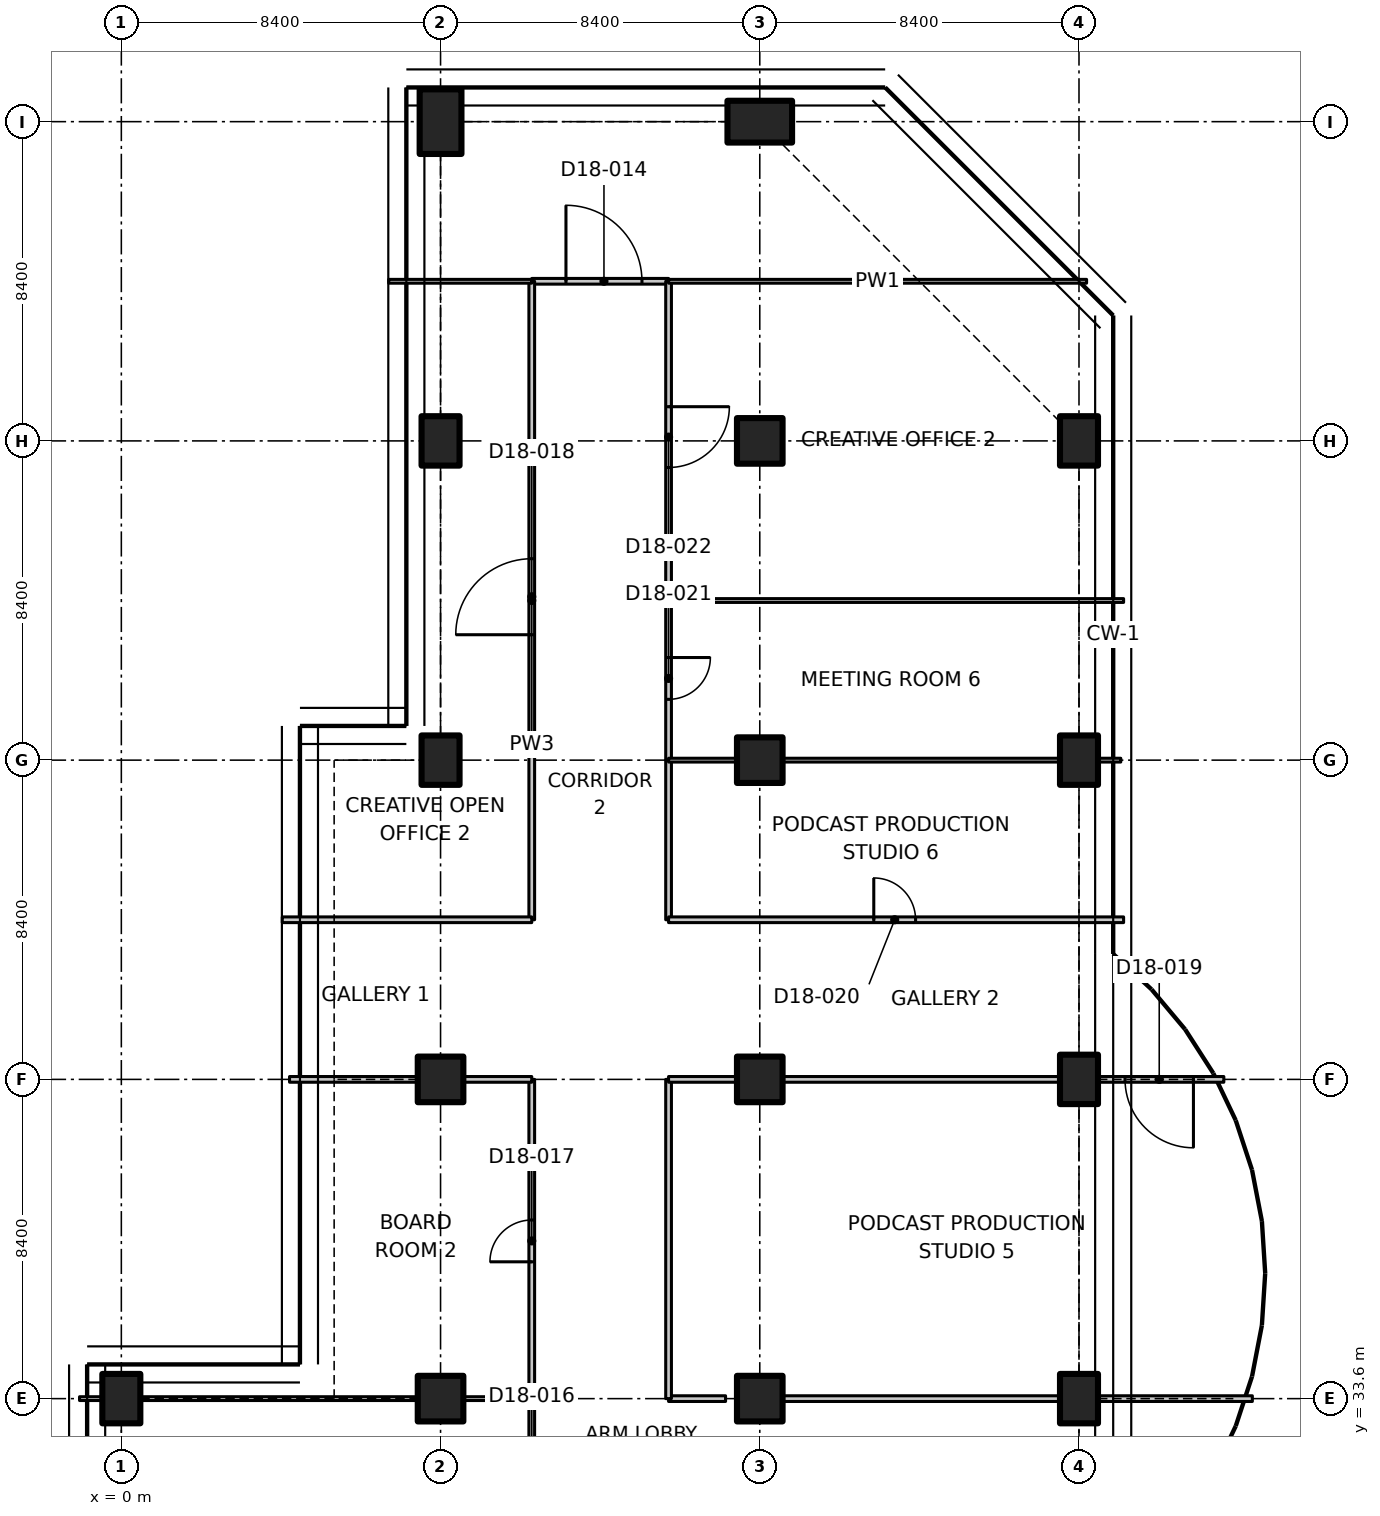
"""IFC4 building model, lengths in metres.
Left out: names, types, materials, properties, quantities, classifications, styles, units other than length and angle.
Written with IfcOpenShell. Run it as: python <this file> out.ifc"""

import sys

from ifc_helpers import new_model, si_unit, direction, frame, frame_2d, origin, origin_2d, place, context, subcontext, project, spatial, polyline, rectangle, outline, extrude, element, fill, save


model = new_model("IFC4")
c1 = context("Model", 3, precision=1e-05, world=origin(), true_north=direction((0.0, 1.0)))
c2 = subcontext(c1, "Body", "Model", "MODEL_VIEW")
j1 = project(units=[si_unit("LENGTHUNIT", "METRE"), si_unit("PLANEANGLEUNIT", "RADIAN")], contexts=[c1])
p1 = place(None, origin())
s1 = spatial("IfcSite", under=j1, at=p1, CompositionType="ELEMENT")
p2 = place(p1, origin())
s2 = spatial("IfcBuilding", under=s1, at=p2, CompositionType="ELEMENT")
p3 = place(p2, frame((0.0, 0.0, 145.7)))
s3 = spatial("IfcBuildingStorey", under=s2, at=p3, CompositionType="ELEMENT", Elevation=145.7)
p4 = place(p3, frame((0.0, 33.6, 0.0), z_axis=(0.0, 0.0, 1.0), x_axis=(1.0, 0.0, 0.0)))
e1 = element("IfcColumn", 1, at=p4, inside=s3, PredefinedType="COLUMN", context=c2, shape_type="SweptSolid", body=[
    extrude(rectangle(XDim=1.0, YDim=1.3, at=origin_2d()), origin(), (0.0, 0.0, 1.0), 3.35),
])
for number, where, z_axis, x_axis in (
    (2, (8.4, 33.6, 0.0), (0.0, 0.0, 1.0), (1.0, 0.0, 0.0)),
    (3, (8.4, 42.0, 0.0), (0.0, 0.0, 1.0), (1.0, 0.0, 0.0)),
):
    element("IfcColumn", number, at=place(p3, frame(where, z_axis=z_axis, x_axis=x_axis)), inside=s3, PredefinedType="COLUMN", context=c2, shape_type="SweptSolid", body=[
        extrude(rectangle(XDim=1.2, YDim=1.2, at=origin_2d()), origin(), (0.0, 0.0, 1.0), 3.35),
    ])
for number, where, z_axis, x_axis in (
    (4, (8.4, 50.4, 0.0), (0.0, 0.0, 1.0), (1.0, 0.0, 0.0)),
    (5, (8.4, 58.8, 0.0), (0.0, 0.0, 1.0), (1.0, 0.0, 0.0)),
):
    element("IfcColumn", number, at=place(p3, frame(where, z_axis=z_axis, x_axis=x_axis)), inside=s3, PredefinedType="COLUMN", context=c2, shape_type="SweptSolid", body=[
        extrude(rectangle(XDim=1.0, YDim=1.3, at=origin_2d()), origin(), (0.0, 0.0, 1.0), 3.35),
    ])
p5 = place(p3, frame((8.4, 67.2, 0.0), z_axis=(0.0, 0.0, 1.0), x_axis=(1.0, 0.0, 0.0)))
e6 = element("IfcColumn", 6, at=p5, inside=s3, PredefinedType="COLUMN", context=c2, shape_type="SweptSolid", body=[
    extrude(rectangle(XDim=1.1, YDim=1.7, at=origin_2d()), origin(), (0.0, 0.0, 1.0), 3.35),
])
for number, where, z_axis, x_axis in (
    (7, (16.8, 33.6, 0.0), (0.0, 0.0, 1.0), (1.0, 0.0, 0.0)),
    (8, (16.8, 42.0, 0.0), (0.0, 0.0, 1.0), (1.0, 0.0, 0.0)),
    (9, (16.8, 50.4, 0.0), (0.0, 0.0, 1.0), (1.0, 0.0, 0.0)),
    (10, (16.8, 58.8, 0.0), (0.0, 0.0, 1.0), (1.0, 0.0, 0.0)),
):
    element("IfcColumn", number, at=place(p3, frame(where, z_axis=z_axis, x_axis=x_axis)), inside=s3, PredefinedType="COLUMN", context=c2, shape_type="SweptSolid", body=[
        extrude(rectangle(XDim=1.2, YDim=1.2, at=origin_2d()), origin(), (0.0, 0.0, 1.0), 3.35),
    ])
p6 = place(p3, frame((16.8, 67.2, 0.0), z_axis=(0.0, 0.0, 1.0), x_axis=(0.0, 1.0, 0.0)))
e11 = element("IfcColumn", 11, at=p6, inside=s3, PredefinedType="COLUMN", context=c2, shape_type="SweptSolid", body=[
    extrude(rectangle(XDim=1.1, YDim=1.7, at=origin_2d()), origin(), (0.0, 0.0, 1.0), 3.35),
])
for number, where, z_axis, x_axis in (
    (12, (25.2, 33.6, 0.0), (0.0, 0.0, 1.0), (1.0, 0.0, 0.0)),
    (13, (25.2, 42.0, 0.0), (0.0, 0.0, 1.0), (1.0, 0.0, 0.0)),
    (14, (25.2, 50.4, 0.0), (0.0, 0.0, 1.0), (1.0, 0.0, 0.0)),
    (15, (25.2, 58.8, 0.0), (0.0, 0.0, 1.0), (1.0, 0.0, 0.0)),
):
    element("IfcColumn", number, at=place(p3, frame(where, z_axis=z_axis, x_axis=x_axis)), inside=s3, PredefinedType="COLUMN", context=c2, shape_type="SweptSolid", body=[
        extrude(rectangle(XDim=1.0, YDim=1.3, at=origin_2d()), origin(), (0.0, 0.0, 1.0), 3.35),
    ])
p7 = place(p3, frame((10.8, 29.4, 0.0), z_axis=(0.0, 0.0, 1.0), x_axis=(0.0, 1.0, 0.0)))
e16 = element("IfcWall", 16, at=p7, inside=s3, PredefinedType="PARTITIONING", context=c2, shape_type="SweptSolid", body=[
    extrude(rectangle(XDim=4.2, YDim=0.15, at=frame_2d((2.1, 0.0))), origin(), (0.0, 0.0, 1.0), 3.33),
])
p8 = place(p7, frame((1.5, 0.0, 0.0)))
e17 = element("IfcOpeningElement", 17, at=p8, cuts=e16, PredefinedType="OPENING", context=c2, shape_type="SweptSolid", body=[
    extrude(rectangle(XDim=1.1, YDim=2.1, at=frame_2d((0.55, 1.05))), frame((0.0, 0.085, 0.0), z_axis=(0.0, -1.0, 0.0), x_axis=(1.0, 0.0, 0.0)), (0.0, 0.0, 1.0), 0.17),
])
p9 = place(p3, frame((14.4, 33.6, 0.0), z_axis=(0.0, 0.0, 1.0), x_axis=(1.0, 0.0, 0.0)))
e18 = element("IfcWall", 18, at=p9, inside=s3, PredefinedType="PARTITIONING", context=c2, shape_type="SweptSolid", body=[
    extrude(rectangle(XDim=1.5, YDim=0.15, at=frame_2d((0.75, 0.0))), origin(), (0.0, 0.0, 1.0), 3.33),
])
p10 = place(p3, frame((17.42, 33.6, 0.0), z_axis=(0.0, 0.0, 1.0), x_axis=(1.0, 0.0, 0.0)))
e19 = element("IfcWall", 19, at=p10, inside=s3, PredefinedType="PARTITIONING", context=c2, shape_type="SweptSolid", body=[
    extrude(rectangle(XDim=7.26, YDim=0.15, at=frame_2d((3.63, 0.0))), origin(), (0.0, 0.0, 1.0), 3.33),
])
p11 = place(p3, frame((25.72, 33.6, 0.0), z_axis=(0.0, 0.0, 1.0), x_axis=(1.0, 0.0, 0.0)))
e20 = element("IfcWall", 20, at=p11, inside=s3, PredefinedType="PARTITIONING", context=c2, shape_type="SweptSolid", body=[
    extrude(rectangle(XDim=4.042, YDim=0.15, at=frame_2d((2.021, 0.0))), origin(), (0.0, 0.0, 1.0), 2.98),
])
p12 = place(p3, frame((10.8, 63.0, 0.0), z_axis=(0.0, 0.0, 1.0), x_axis=(1.0, 0.0, 0.0)))
e21 = element("IfcWall", 21, at=p12, inside=s3, PredefinedType="PARTITIONING", context=c2, shape_type="SweptSolid", body=[
    extrude(rectangle(XDim=3.6, YDim=0.15, at=frame_2d((1.8, 0.0))), origin(), (0.0, 0.0, 1.0), 3.33),
])
p13 = place(p12, frame((0.9, 0.0, 0.0)))
e22 = element("IfcOpeningElement", 22, at=p13, cuts=e21, PredefinedType="OPENING", context=c2, shape_type="SweptSolid", body=[
    extrude(rectangle(XDim=2.0, YDim=2.4, at=frame_2d((1.0, 1.2))), frame((0.0, 0.085, 0.0), z_axis=(0.0, -1.0, 0.0), x_axis=(1.0, 0.0, 0.0)), (0.0, 0.0, 1.0), 0.17),
])
p14 = place(p3, frame((10.8, 33.6, 0.0), z_axis=(0.0, 0.0, 1.0), x_axis=(0.0, 1.0, 0.0)))
e23 = element("IfcWall", 23, at=p14, inside=s3, PredefinedType="PARTITIONING", context=c2, shape_type="SweptSolid", body=[
    extrude(rectangle(XDim=8.4, YDim=0.15, at=frame_2d((4.2, 0.0))), origin(), (0.0, 0.0, 1.0), 3.33),
])
p15 = place(p14, frame((3.6, 0.0, 0.0)))
e24 = element("IfcOpeningElement", 24, at=p15, cuts=e23, PredefinedType="OPENING", context=c2, shape_type="SweptSolid", body=[
    extrude(rectangle(XDim=1.1, YDim=2.1, at=frame_2d((0.55, 1.05))), frame((0.0, 0.085, 0.0), z_axis=(0.0, -1.0, 0.0), x_axis=(1.0, 0.0, 0.0)), (0.0, 0.0, 1.0), 0.17),
])
p16 = place(p3, frame((10.8, 46.2, 0.0), z_axis=(0.0, 0.0, 1.0), x_axis=(0.0, 1.0, 0.0)))
e25 = element("IfcWall", 25, at=p16, inside=s3, PredefinedType="PARTITIONING", context=c2, shape_type="SweptSolid", body=[
    extrude(rectangle(XDim=16.8, YDim=0.15, at=frame_2d((8.4, 0.0))), origin(), (0.0, 0.0, 1.0), 3.33),
])
p17 = place(p16, frame((7.5, 0.0, 0.0)))
e26 = element("IfcOpeningElement", 26, at=p17, cuts=e25, PredefinedType="OPENING", context=c2, shape_type="SweptSolid", body=[
    extrude(rectangle(XDim=2.0, YDim=2.4, at=frame_2d((1.0, 1.2))), frame((0.0, 0.085, 0.0), z_axis=(0.0, -1.0, 0.0), x_axis=(1.0, 0.0, 0.0)), (0.0, 0.0, 1.0), 0.17),
])
p18 = place(p3, frame((14.4, 42.0, 0.0), z_axis=(0.0, 0.0, 1.0), x_axis=(0.0, -1.0, 0.0)))
e27 = element("IfcWall", 27, at=p18, inside=s3, PredefinedType="PARTITIONING", context=c2, shape_type="SweptSolid", body=[
    extrude(rectangle(XDim=8.4, YDim=0.15, at=frame_2d((4.2, 0.0))), origin(), (0.0, 0.0, 1.0), 3.33),
])
p19 = place(p3, frame((14.4, 50.4, 0.0), z_axis=(0.0, 0.0, 1.0), x_axis=(0.0, -1.0, 0.0)))
e28 = element("IfcWall", 28, at=p19, inside=s3, PredefinedType="PARTITIONING", context=c2, shape_type="SweptSolid", body=[
    extrude(rectangle(XDim=4.2, YDim=0.15, at=frame_2d((2.1, 0.0))), origin(), (0.0, 0.0, 1.0), 3.33),
])
p20 = place(p3, frame((14.4, 54.6, 0.0), z_axis=(0.0, 0.0, 1.0), x_axis=(0.0, -1.0, 0.0)))
e29 = element("IfcWall", 29, at=p20, inside=s3, PredefinedType="PARTITIONING", context=c2, shape_type="SweptSolid", body=[
    extrude(rectangle(XDim=4.2, YDim=0.15, at=frame_2d((2.1, 0.0))), origin(), (0.0, 0.0, 1.0), 3.33),
])
p21 = place(p20, frame((1.5, 0.0, 0.0)))
e30 = element("IfcOpeningElement", 30, at=p21, cuts=e29, PredefinedType="OPENING", context=c2, shape_type="SweptSolid", body=[
    extrude(rectangle(XDim=1.1, YDim=2.1, at=frame_2d((0.55, 1.05))), frame((0.0, 0.085, 0.0), z_axis=(0.0, -1.0, 0.0), x_axis=(1.0, 0.0, 0.0)), (0.0, 0.0, 1.0), 0.17),
])
p22 = place(p3, frame((14.4, 63.0, 0.0), z_axis=(0.0, 0.0, 1.0), x_axis=(0.0, -1.0, 0.0)))
e31 = element("IfcWall", 31, at=p22, inside=s3, PredefinedType="PARTITIONING", context=c2, shape_type="SweptSolid", body=[
    extrude(rectangle(XDim=8.4, YDim=0.15, at=frame_2d((4.2, 0.0))), origin(), (0.0, 0.0, 1.0), 3.33),
])
p23 = place(p22, frame((3.3, 0.0, 0.0)))
e32 = element("IfcOpeningElement", 32, at=p23, cuts=e31, PredefinedType="OPENING", context=c2, shape_type="SweptSolid", body=[
    extrude(rectangle(XDim=1.6, YDim=2.1, at=frame_2d((0.8, 1.05))), frame((0.0, 0.085, 0.0), z_axis=(0.0, -1.0, 0.0), x_axis=(1.0, 0.0, 0.0)), (0.0, 0.0, 1.0), 0.17),
])
p24 = place(p3, frame((10.8, 63.0, 0.0), z_axis=(0.0, 0.0, 1.0), x_axis=(-1.0, 0.0, 0.0)))
e33 = element("IfcWall", 33, at=p24, inside=s3, PredefinedType="PARTITIONING", context=c2, shape_type="SweptSolid", body=[
    extrude(rectangle(XDim=3.765, YDim=0.1, at=frame_2d((1.883, 0.0))), origin(), (0.0, 0.0, 1.0), 2.98),
])
p25 = place(p3, frame((25.4, 63.0, 0.0), z_axis=(0.0, 0.0, 1.0), x_axis=(-1.0, 0.0, 0.0)))
e34 = element("IfcWall", 34, at=p25, inside=s3, PredefinedType="PARTITIONING", context=c2, shape_type="SweptSolid", body=[
    extrude(outline(polyline([(0.0, 0.0), (11.0, 0.0), (11.0, 3.33), (5.066, 3.33), (5.064, 2.98), (3.736, 2.98), (3.734, 3.33), (0.0, 3.33), (0.0, 0.0)])), frame((0.0, 0.05, 0.0), z_axis=(0.0, -1.0, 0.0), x_axis=(1.0, 0.0, 0.0)), (0.0, 0.0, 1.0), 0.1),
])
p26 = place(p3, frame((10.8, 42.0, 0.0), z_axis=(0.0, 0.0, 1.0), x_axis=(-1.0, 0.0, 0.0)))
e35 = element("IfcWall", 35, at=p26, inside=s3, PredefinedType="PARTITIONING", context=c2, shape_type="SweptSolid", body=[
    extrude(rectangle(XDim=1.78, YDim=0.15, at=frame_2d((0.89, 0.0))), origin(), (0.0, 0.0, 1.0), 3.33),
])
p27 = place(p3, frame((7.78, 42.0, 0.0), z_axis=(0.0, 0.0, 1.0), x_axis=(-1.0, 0.0, 0.0)))
e36 = element("IfcWall", 36, at=p27, inside=s3, PredefinedType="PARTITIONING", context=c2, shape_type="SweptSolid", body=[
    extrude(rectangle(XDim=3.354, YDim=0.15, at=frame_2d((1.677, 0.0))), origin(), (0.0, 0.0, 1.0), 2.98),
])
p28 = place(p3, frame((4.235, 46.2, 0.0), z_axis=(0.0, 0.0, 1.0), x_axis=(1.0, 0.0, 0.0)))
e37 = element("IfcWall", 37, at=p28, inside=s3, PredefinedType="PARTITIONING", context=c2, shape_type="SweptSolid", body=[
    extrude(outline(polyline([(0.0, 0.0), (6.565, 0.0), (6.565, 3.33), (1.815, 3.33), (1.813, 2.98), (0.917, 2.98), (0.915, 3.33), (0.265, 3.33), (0.0, 3.33), (0.0, 0.0)])), frame((0.0, 0.075, 0.0), z_axis=(0.0, -1.0, 0.0), x_axis=(1.0, 0.0, 0.0)), (0.0, 0.0, 1.0), 0.15),
])
p29 = place(p3, frame((-1.1, 33.6, 0.0), z_axis=(0.0, 0.0, 1.0), x_axis=(1.0, 0.0, 0.0)))
e38 = element("IfcWall", 38, at=p29, inside=s3, PredefinedType="PARTITIONING", context=c2, shape_type="SweptSolid", body=[
    extrude(rectangle(XDim=0.58, YDim=0.1, at=frame_2d((0.29, 0.0))), origin(), (0.0, 0.0, 1.0), 3.33),
])
p30 = place(p3, frame((0.52, 33.6, 0.0), z_axis=(0.0, 0.0, 1.0), x_axis=(1.0, 0.0, 0.0)))
e39 = element("IfcWall", 39, at=p30, inside=s3, PredefinedType="PARTITIONING", context=c2, shape_type="SweptSolid", body=[
    extrude(outline(polyline([(0.0, 0.0), (7.26, 0.0), (7.26, 2.98), (0.0, 2.98), (0.0, 0.0)])), frame((0.0, 0.05, 0.0), z_axis=(0.0, -1.0, 0.0), x_axis=(1.0, 0.0, 0.0)), (0.0, 0.0, 1.0), 0.1),
])
p31 = place(p3, frame((9.02, 33.6, 0.0), z_axis=(0.0, 0.0, 1.0), x_axis=(1.0, 0.0, 0.0)))
e40 = element("IfcWall", 40, at=p31, inside=s3, PredefinedType="PARTITIONING", context=c2, shape_type="SweptSolid", body=[
    extrude(rectangle(XDim=1.78, YDim=0.1, at=frame_2d((0.89, 0.0))), origin(), (0.0, 0.0, 1.0), 3.33),
])
p32 = place(p3, frame((29.011, 42.0, 0.0), z_axis=(0.0, 0.0, 1.0), x_axis=(-1.0, 0.0, 0.0)))
e41 = element("IfcWall", 41, at=p32, inside=s3, PredefinedType="PARTITIONING", context=c2, shape_type="SweptSolid", body=[
    extrude(rectangle(XDim=3.292, YDim=0.15, at=frame_2d((1.646, 0.0))), origin(), (0.0, 0.0, 1.0), 2.98),
])
p33 = place(p32, frame((0.8, 0.0, 0.0)))
e42 = element("IfcOpeningElement", 42, at=p33, cuts=e41, PredefinedType="OPENING", context=c2, shape_type="SweptSolid", body=[
    extrude(rectangle(XDim=1.8, YDim=2.1, at=frame_2d((0.9, 1.05))), frame((0.0, 0.085, 0.0), z_axis=(0.0, -1.0, 0.0), x_axis=(1.0, 0.0, 0.0)), (0.0, 0.0, 1.0), 0.17),
])
p34 = place(p3, frame((24.68, 42.0, 0.0), z_axis=(0.0, 0.0, 1.0), x_axis=(-1.0, 0.0, 0.0)))
e43 = element("IfcWall", 43, at=p34, inside=s3, PredefinedType="PARTITIONING", context=c2, shape_type="SweptSolid", body=[
    extrude(rectangle(XDim=7.26, YDim=0.15, at=frame_2d((3.63, 0.0))), origin(), (0.0, 0.0, 1.0), 3.33),
])
p35 = place(p3, frame((16.18, 42.0, 0.0), z_axis=(0.0, 0.0, 1.0), x_axis=(-1.0, 0.0, 0.0)))
e44 = element("IfcWall", 44, at=p35, inside=s3, PredefinedType="PARTITIONING", context=c2, shape_type="SweptSolid", body=[
    extrude(rectangle(XDim=1.78, YDim=0.15, at=frame_2d((0.89, 0.0))), origin(), (0.0, 0.0, 1.0), 3.33),
])
p36 = place(p3, frame((14.4, 46.2, 0.0), z_axis=(0.0, 0.0, 1.0), x_axis=(1.0, 0.0, 0.0)))
e45 = element("IfcWall", 45, at=p36, inside=s3, PredefinedType="PARTITIONING", context=c2, shape_type="SweptSolid", body=[
    extrude(outline(polyline([(0.0, 0.0), (11.974, 0.0), (11.974, 3.33), (11.9, 3.33), (11.25, 3.33), (11.248, 2.98), (10.352, 2.98), (10.35, 3.33), (0.0, 3.33), (0.0, 0.0)])), frame((0.0, 0.075, 0.0), z_axis=(0.0, -1.0, 0.0), x_axis=(1.0, 0.0, 0.0)), (0.0, 0.0, 1.0), 0.15),
])
p37 = place(p36, frame((5.4, 0.0, 0.0)))
e46 = element("IfcOpeningElement", 46, at=p37, cuts=e45, PredefinedType="OPENING", context=c2, shape_type="SweptSolid", body=[
    extrude(rectangle(XDim=1.1, YDim=2.1, at=frame_2d((0.55, 1.05))), frame((0.0, 0.085, 0.0), z_axis=(0.0, -1.0, 0.0), x_axis=(1.0, 0.0, 0.0)), (0.0, 0.0, 1.0), 0.17),
])
p38 = place(p3, frame((14.4, 50.4, 0.0), z_axis=(0.0, 0.0, 1.0), x_axis=(1.0, 0.0, 0.0)))
e47 = element("IfcWall", 47, at=p38, inside=s3, PredefinedType="PARTITIONING", context=c2, shape_type="SweptSolid", body=[
    extrude(rectangle(XDim=1.78, YDim=0.1, at=frame_2d((0.89, 0.0))), origin(), (0.0, 0.0, 1.0), 3.33),
])
p39 = place(p3, frame((17.42, 50.4, 0.0), z_axis=(0.0, 0.0, 1.0), x_axis=(1.0, 0.0, 0.0)))
e48 = element("IfcWall", 48, at=p39, inside=s3, PredefinedType="PARTITIONING", context=c2, shape_type="SweptSolid", body=[
    extrude(rectangle(XDim=7.26, YDim=0.1, at=frame_2d((3.63, 0.0))), origin(), (0.0, 0.0, 1.0), 3.33),
])
p40 = place(p3, frame((25.72, 50.4, 0.0), z_axis=(0.0, 0.0, 1.0), x_axis=(1.0, 0.0, 0.0)))
e49 = element("IfcWall", 49, at=p40, inside=s3, PredefinedType="PARTITIONING", context=c2, shape_type="SweptSolid", body=[
    extrude(rectangle(XDim=0.58, YDim=0.1, at=frame_2d((0.29, 0.0))), origin(), (0.0, 0.0, 1.0), 3.33),
])
p41 = place(p3, frame((14.4, 54.6, 0.0), z_axis=(0.0, 0.0, 1.0), x_axis=(1.0, 0.0, 0.0)))
e50 = element("IfcWall", 50, at=p41, inside=s3, PredefinedType="PARTITIONING", context=c2, shape_type="SweptSolid", body=[
    extrude(outline(polyline([(0.0, 0.0), (11.974, 0.0), (11.974, 3.33), (11.9, 3.33), (11.25, 3.33), (11.248, 2.98), (10.352, 2.98), (10.35, 3.33), (0.0, 3.33), (0.0, 0.0)])), frame((0.0, 0.05, 0.0), z_axis=(0.0, -1.0, 0.0), x_axis=(1.0, 0.0, 0.0)), (0.0, 0.0, 1.0), 0.1),
])
p42 = place(p13, origin())
e51 = element("IfcDoor", 51, at=p42, inside=s3, OperationType="DOUBLE_DOOR_SINGLE_SWING", PredefinedType="DOOR", context=c2, shape_type="SweptSolid", body=[
    extrude(rectangle(XDim=2.0, YDim=2.4, at=frame_2d((1.0, 1.2))), frame((0.0, 0.025, 0.0), z_axis=(0.0, -1.0, 0.0), x_axis=(1.0, 0.0, 0.0)), (0.0, 0.0, 1.0), 0.05),
])
fill(e22, e51)
p43 = place(p15, origin())
e52 = element("IfcDoor", 52, at=p43, inside=s3, OperationType="SINGLE_SWING_LEFT", PredefinedType="DOOR", context=c2, shape_type="SweptSolid", body=[
    extrude(rectangle(XDim=1.1, YDim=2.1, at=frame_2d((0.55, 1.05))), frame((0.0, 0.025, 0.0), z_axis=(0.0, -1.0, 0.0), x_axis=(1.0, 0.0, 0.0)), (0.0, 0.0, 1.0), 0.05),
])
fill(e24, e52)
p44 = place(p17, origin())
e53 = element("IfcDoor", 53, at=p44, inside=s3, OperationType="DOUBLE_DOOR_SINGLE_SWING", PredefinedType="DOOR", context=c2, shape_type="SweptSolid", body=[
    extrude(rectangle(XDim=2.0, YDim=2.4, at=frame_2d((1.0, 1.2))), frame((0.0, 0.025, 0.0), z_axis=(0.0, -1.0, 0.0), x_axis=(1.0, 0.0, 0.0)), (0.0, 0.0, 1.0), 0.05),
])
fill(e26, e53)
p45 = place(p33, origin())
e54 = element("IfcDoor", 54, at=p45, inside=s3, OperationType="DOUBLE_DOOR_SINGLE_SWING", PredefinedType="DOOR", context=c2, shape_type="SweptSolid", body=[
    extrude(rectangle(XDim=1.8, YDim=2.1, at=frame_2d((0.9, 1.05))), frame((0.0, 0.025, 0.0), z_axis=(0.0, -1.0, 0.0), x_axis=(1.0, 0.0, 0.0)), (0.0, 0.0, 1.0), 0.05),
])
fill(e42, e54)
p46 = place(p37, origin())
e55 = element("IfcDoor", 55, at=p46, inside=s3, OperationType="SINGLE_SWING_LEFT", PredefinedType="DOOR", context=c2, shape_type="SweptSolid", body=[
    extrude(rectangle(XDim=1.1, YDim=2.1, at=frame_2d((0.55, 1.05))), frame((0.0, 0.025, 0.0), z_axis=(0.0, -1.0, 0.0), x_axis=(1.0, 0.0, 0.0)), (0.0, 0.0, 1.0), 0.05),
])
fill(e46, e55)
p47 = place(p21, origin())
e56 = element("IfcDoor", 56, at=p47, inside=s3, OperationType="SINGLE_SWING_LEFT", PredefinedType="DOOR", context=c2, shape_type="SweptSolid", body=[
    extrude(rectangle(XDim=1.1, YDim=2.1, at=frame_2d((0.55, 1.05))), frame((0.0, 0.025, 0.0), z_axis=(0.0, -1.0, 0.0), x_axis=(1.0, 0.0, 0.0)), (0.0, 0.0, 1.0), 0.05),
])
fill(e30, e56)
p48 = place(p23, origin())
e57 = element("IfcDoor", 57, at=p48, inside=s3, OperationType="DOUBLE_DOOR_SINGLE_SWING", PredefinedType="DOOR", context=c2, shape_type="SweptSolid", body=[
    extrude(rectangle(XDim=1.6, YDim=2.1, at=frame_2d((0.8, 1.05))), frame((0.0, 0.025, 0.0), z_axis=(0.0, -1.0, 0.0), x_axis=(1.0, 0.0, 0.0)), (0.0, 0.0, 1.0), 0.05),
])
fill(e32, e57)
save(model, sys.argv[1])
